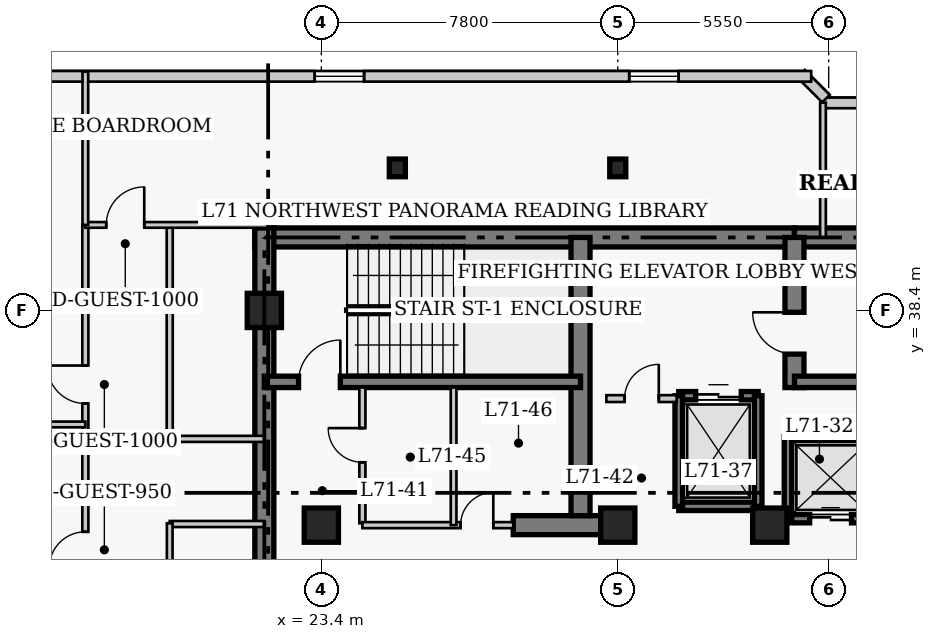
"""IFC4 building model, lengths in metres.
Left out: names, types, materials, properties, quantities, classifications, styles, units other than length and angle.
Written with IfcOpenShell. Run it as: python <this file> out.ifc"""

import sys

from ifc_helpers import new_model, si_unit, direction, frame, frame_2d, origin, origin_2d, place, context, subcontext, project, spatial, rectangle, i_section, extrude, element, fill, save


model = new_model("IFC4")
c1 = context("Model", 3, precision=1e-05, world=origin(), true_north=direction((0.0, 1.0)))
c2 = subcontext(c1, "Body", "Model", "MODEL_VIEW")
j1 = project(units=[si_unit("LENGTHUNIT", "METRE"), si_unit("PLANEANGLEUNIT", "RADIAN")], contexts=[c1])
p1 = place(None, origin())
s1 = spatial("IfcSite", under=j1, at=p1, CompositionType="ELEMENT")
p2 = place(p1, origin())
s2 = spatial("IfcBuilding", under=s1, at=p2, CompositionType="ELEMENT")
p3 = place(p2, frame((0.0, 0.0, 285.4)))
s3 = spatial("IfcBuildingStorey", under=s2, at=p3, CompositionType="ELEMENT", Elevation=285.4)
p4 = place(p3, frame((21.65, 40.32, 0.0), z_axis=(0.0, 0.0, 1.0), x_axis=(1.0, 0.0, 0.0)))
e1 = element("IfcWall", 1, at=p4, inside=s3, PredefinedType="SHEAR", context=c2, shape_type="SweptSolid", body=[
    extrude(rectangle(XDim=14.2, YDim=0.5, at=frame_2d((7.1, 0.0))), origin(), (0.0, 0.0, 1.0), 4.0),
])
p5 = place(p3, frame((35.85, 40.32, 0.0), z_axis=(0.0, 0.0, 1.0), x_axis=(1.0, 0.0, 0.0)))
e2 = element("IfcWall", 2, at=p5, inside=s3, PredefinedType="SHEAR", context=c2, shape_type="SweptSolid", body=[
    extrude(rectangle(XDim=12.6, YDim=0.5, at=frame_2d((6.3, 0.0))), origin(), (0.0, 0.0, 1.0), 4.0),
])
p6 = place(p3, frame((21.9, 27.05, 0.0), z_axis=(0.0, 0.0, 1.0), x_axis=(0.0, 1.0, 0.0)))
e3 = element("IfcWall", 3, at=p6, inside=s3, PredefinedType="SHEAR", context=c2, shape_type="SweptSolid", body=[
    extrude(rectangle(XDim=13.52, YDim=0.5, at=frame_2d((6.76, 0.0))), origin(), (0.0, 0.0, 1.0), 4.0),
])
p7 = place(p3, frame((28.45, 32.75, 0.0), z_axis=(0.0, 0.0, 1.0), x_axis=(1.0, 0.0, 0.0)))
e4 = element("IfcWall", 4, at=p7, inside=s3, PredefinedType="SHEAR", context=c2, shape_type="SweptSolid", body=[
    extrude(rectangle(XDim=2.4, YDim=0.5, at=frame_2d((1.2, 0.0))), origin(), (0.0, 0.0, 1.0), 4.0),
])
p8 = place(p3, frame((30.22, 33.0, 0.0), z_axis=(0.0, 0.0, 1.0), x_axis=(0.0, 1.0, 0.0)))
e5 = element("IfcWall", 5, at=p8, inside=s3, PredefinedType="SHEAR", context=c2, shape_type="SweptSolid", body=[
    extrude(rectangle(XDim=7.32, YDim=0.5, at=frame_2d((3.66, 0.0))), origin(), (0.0, 0.0, 1.0), 4.0),
])
p9 = place(p3, frame((35.85, 36.37, 0.0), z_axis=(0.0, 0.0, 1.0), x_axis=(0.0, 1.0, 0.0)))
e6 = element("IfcWall", 6, at=p9, inside=s3, PredefinedType="SHEAR", context=c2, shape_type="SweptSolid", body=[
    extrude(rectangle(XDim=3.95, YDim=0.5, at=frame_2d((1.975, 0.0))), origin(), (0.0, 0.0, 1.0), 4.0),
])
p10 = place(p9, frame((0.88, 0.0, 0.0)))
e7 = element("IfcOpeningElement", 7, at=p10, cuts=e6, PredefinedType="OPENING", context=c2, shape_type="SweptSolid", body=[
    extrude(rectangle(XDim=1.1, YDim=2.15, at=frame_2d((0.55, 1.075))), frame((0.0, 0.26, 0.0), z_axis=(0.0, -1.0, 0.0), x_axis=(1.0, 0.0, 0.0)), (0.0, 0.0, 1.0), 0.52),
])
p11 = place(p3, frame((21.9, 36.52, 0.0), z_axis=(0.0, 0.0, 1.0), x_axis=(1.0, 0.0, 0.0)))
e8 = element("IfcWall", 8, at=p11, inside=s3, PredefinedType="SHEAR", context=c2, shape_type="SweptSolid", body=[
    extrude(rectangle(XDim=8.32, YDim=0.3, at=frame_2d((4.16, 0.0))), origin(), (0.0, 0.0, 1.0), 4.0),
])
p12 = place(p11, frame((0.9, 0.0, 0.0)))
e9 = element("IfcOpeningElement", 9, at=p12, cuts=e8, PredefinedType="OPENING", context=c2, shape_type="SweptSolid", body=[
    extrude(rectangle(XDim=1.1, YDim=2.15, at=frame_2d((0.55, 1.075))), frame((0.0, 0.16, 0.0), z_axis=(0.0, -1.0, 0.0), x_axis=(1.0, 0.0, 0.0)), (0.0, 0.0, 1.0), 0.32),
])
p13 = place(p3, frame((35.85, 36.52, 0.0), z_axis=(0.0, 0.0, 1.0), x_axis=(1.0, 0.0, 0.0)))
e10 = element("IfcWall", 10, at=p13, inside=s3, PredefinedType="SHEAR", context=c2, shape_type="SweptSolid", body=[
    extrude(rectangle(XDim=8.33, YDim=0.3, at=frame_2d((4.165, 0.0))), origin(), (0.0, 0.0, 1.0), 4.0),
])
for number, where, z_axis, x_axis in (
    (11, (21.9, 38.4, 0.0), (0.0, 0.0, 1.0), (1.0, 0.0, 0.0)),
    (12, (23.4, 32.75, 0.0), (0.0, 0.0, 1.0), (1.0, 0.0, 0.0)),
    (13, (31.2, 32.75, 0.0), (0.0, 0.0, 1.0), (1.0, 0.0, 0.0)),
    (14, (35.2, 32.75, 0.0), (0.0, 0.0, 1.0), (1.0, 0.0, 0.0)),
):
    element("IfcColumn", number, at=place(p3, frame(where, z_axis=z_axis, x_axis=x_axis)), inside=s3, PredefinedType="COLUMN", context=c2, shape_type="SweptSolid", body=[
        extrude(rectangle(XDim=0.9, YDim=0.9, at=origin_2d()), origin(), (0.0, 0.0, 1.0), 4.0),
    ])
for number, where, z_axis, x_axis in (
    (15, (25.4, 42.15, 0.0), (0.0, 0.0, 1.0), (1.0, 0.0, 0.0)),
    (16, (31.2, 42.15, 0.0), (0.0, 0.0, 1.0), (1.0, 0.0, 0.0)),
):
    element("IfcColumn", number, at=place(p3, frame(where, z_axis=z_axis, x_axis=x_axis)), inside=s3, PredefinedType="COLUMN", context=c2, shape_type="SweptSolid", body=[
        extrude(i_section(OverallWidth=0.422, OverallDepth=0.465, WebThickness=0.045, FlangeThickness=0.073, FilletRadius=0.017, at=origin_2d()), origin(), (0.0, 0.0, 1.0), 4.0),
    ])
p14 = place(p3, frame((41.39, 43.86, 0.0), z_axis=(0.0, 0.0, 1.0), x_axis=(-1.0, 0.0, 0.0)))
e17 = element("IfcWall", 17, at=p14, inside=s3, PredefinedType="SOLIDWALL", context=c2, shape_type="SweptSolid", body=[
    extrude(rectangle(XDim=4.78, YDim=0.28, at=frame_2d((2.39, 0.0))), origin(), (0.0, 0.0, 1.0), 3.76),
])
p15 = place(p14, frame((1.74, 0.0, 0.85)))
e18 = element("IfcOpeningElement", 18, at=p15, cuts=e17, PredefinedType="OPENING", context=c2, shape_type="SweptSolid", body=[
    extrude(rectangle(XDim=1.3, YDim=1.7, at=frame_2d((0.65, 0.85))), frame((0.0, 0.15, 0.0), z_axis=(0.0, -1.0, 0.0), x_axis=(1.0, 0.0, 0.0)), (0.0, 0.0, 1.0), 0.3),
])
p16 = place(p3, frame((36.679, 43.973, 0.0), z_axis=(0.0, 0.0, 1.0), x_axis=(-0.706975312048, 0.707238225886, 0.0)))
e19 = element("IfcWall", 19, at=p16, inside=s3, PredefinedType="SOLIDWALL", context=c2, shape_type="SweptSolid", body=[
    extrude(rectangle(XDim=0.929, YDim=0.28, at=frame_2d((0.464, 0.0))), origin(), (0.0, 0.0, 1.0), 3.76),
])
p17 = place(p3, frame((36.29, 44.56, 0.0), z_axis=(0.0, 0.0, 1.0), x_axis=(-1.0, 0.0, 0.0)))
e20 = element("IfcWall", 20, at=p17, inside=s3, PredefinedType="SOLIDWALL", context=c2, shape_type="SweptSolid", body=[
    extrude(rectangle(XDim=24.83, YDim=0.28, at=frame_2d((12.415, 0.0))), origin(), (0.0, 0.0, 1.0), 3.76),
])
p18 = place(p17, frame((3.488, 0.0, 0.85)))
e21 = element("IfcOpeningElement", 21, at=p18, cuts=e20, PredefinedType="OPENING", context=c2, shape_type="SweptSolid", body=[
    extrude(rectangle(XDim=1.3, YDim=1.7, at=frame_2d((0.65, 0.85))), frame((0.0, 0.15, 0.0), z_axis=(0.0, -1.0, 0.0), x_axis=(1.0, 0.0, 0.0)), (0.0, 0.0, 1.0), 0.3),
])
p19 = place(p17, frame((11.765, 0.0, 0.85)))
e22 = element("IfcOpeningElement", 22, at=p19, cuts=e20, PredefinedType="OPENING", context=c2, shape_type="SweptSolid", body=[
    extrude(rectangle(XDim=1.3, YDim=1.7, at=frame_2d((0.65, 0.85))), frame((0.0, 0.15, 0.0), z_axis=(0.0, -1.0, 0.0), x_axis=(1.0, 0.0, 0.0)), (0.0, 0.0, 1.0), 0.3),
])
p20 = place(p17, frame((20.042, 0.0, 0.85)))
e23 = element("IfcOpeningElement", 23, at=p20, cuts=e20, PredefinedType="OPENING", context=c2, shape_type="SweptSolid", body=[
    extrude(rectangle(XDim=1.3, YDim=1.7, at=frame_2d((0.65, 0.85))), frame((0.0, 0.15, 0.0), z_axis=(0.0, -1.0, 0.0), x_axis=(1.0, 0.0, 0.0)), (0.0, 0.0, 1.0), 0.3),
])
p21 = place(p3, frame((35.68, 35.08, 0.0), z_axis=(0.0, 0.0, 1.0), x_axis=(1.0, 0.0, 0.0)))
e24 = element("IfcWall", 24, at=p21, inside=s3, PredefinedType="SHEAR", context=c2, shape_type="SweptSolid", body=[
    extrude(rectangle(XDim=2.32, YDim=0.22, at=frame_2d((1.16, 0.0))), origin(), (0.0, 0.0, 1.0), 4.0),
])
p22 = place(p3, frame((35.68, 32.92, 0.0), z_axis=(0.0, 0.0, 1.0), x_axis=(1.0, 0.0, 0.0)))
e25 = element("IfcWall", 25, at=p22, inside=s3, PredefinedType="SHEAR", context=c2, shape_type="SweptSolid", body=[
    extrude(rectangle(XDim=2.32, YDim=0.22, at=frame_2d((1.16, 0.0))), origin(), (0.0, 0.0, 1.0), 4.0),
])
p23 = place(p22, frame((0.57, 0.0, 0.0)))
e26 = element("IfcOpeningElement", 26, at=p23, cuts=e25, PredefinedType="OPENING", context=c2, shape_type="SweptSolid", body=[
    extrude(rectangle(XDim=1.1, YDim=2.15, at=frame_2d((0.55, 1.075))), frame((0.0, 0.12, 0.0), z_axis=(0.0, -1.0, 0.0), x_axis=(1.0, 0.0, 0.0)), (0.0, 0.0, 1.0), 0.24),
])
p24 = place(p3, frame((35.68, 32.92, 0.0), z_axis=(0.0, 0.0, 1.0), x_axis=(0.0, 1.0, 0.0)))
e27 = element("IfcWall", 27, at=p24, inside=s3, PredefinedType="SHEAR", context=c2, shape_type="SweptSolid", body=[
    extrude(rectangle(XDim=2.16, YDim=0.2, at=frame_2d((1.08, 0.0))), origin(), (0.0, 0.0, 1.0), 4.0),
])
p25 = place(p3, frame((32.805, 36.155, 0.0), z_axis=(0.0, 0.0, 1.0), x_axis=(1.0, 0.0, 0.0)))
e28 = element("IfcWall", 28, at=p25, inside=s3, PredefinedType="SHEAR", context=c2, shape_type="SweptSolid", body=[
    extrude(rectangle(XDim=2.09, YDim=0.22, at=frame_2d((1.045, 0.0))), origin(), (0.0, 0.0, 1.0), 4.0),
])
p26 = place(p25, frame((0.445, 0.0, 0.0)))
e29 = element("IfcOpeningElement", 29, at=p26, cuts=e28, PredefinedType="OPENING", context=c2, shape_type="SweptSolid", body=[
    extrude(rectangle(XDim=1.2, YDim=2.15, at=frame_2d((0.6, 1.075))), frame((0.0, 0.12, 0.0), z_axis=(0.0, -1.0, 0.0), x_axis=(1.0, 0.0, 0.0)), (0.0, 0.0, 1.0), 0.24),
])
p27 = place(p3, frame((32.805, 33.245, 0.0), z_axis=(0.0, 0.0, 1.0), x_axis=(1.0, 0.0, 0.0)))
e30 = element("IfcWall", 30, at=p27, inside=s3, PredefinedType="SHEAR", context=c2, shape_type="SweptSolid", body=[
    extrude(rectangle(XDim=2.09, YDim=0.22, at=frame_2d((1.045, 0.0))), origin(), (0.0, 0.0, 1.0), 4.0),
])
for number, where, z_axis, x_axis in (
    (31, (32.805, 33.245, 0.0), (0.0, 0.0, 1.0), (0.0, 1.0, 0.0)),
    (32, (34.895, 33.245, 0.0), (0.0, 0.0, 1.0), (0.0, 1.0, 0.0)),
):
    element("IfcWall", number, at=place(p3, frame(where, z_axis=z_axis, x_axis=x_axis)), inside=s3, PredefinedType="SHEAR", context=c2, shape_type="SweptSolid", body=[
        extrude(rectangle(XDim=2.91, YDim=0.2, at=frame_2d((1.455, 0.0))), origin(), (0.0, 0.0, 1.0), 4.0),
    ])
p28 = place(p3, frame((30.9, 36.08, 0.0), z_axis=(0.0, 0.0, 1.0), x_axis=(1.0, 0.0, 0.0)))
e33 = element("IfcWall", 33, at=p28, inside=s3, PredefinedType="PARTITIONING", context=c2, shape_type="SweptSolid", body=[
    extrude(rectangle(XDim=1.85, YDim=0.18, at=frame_2d((0.925, 0.0))), origin(), (0.0, 0.0, 1.0), 3.76),
])
p29 = place(p28, frame((0.48, 0.0, 0.0)))
e34 = element("IfcOpeningElement", 34, at=p29, cuts=e33, PredefinedType="OPENING", context=c2, shape_type="SweptSolid", body=[
    extrude(rectangle(XDim=0.9, YDim=2.15, at=frame_2d((0.45, 1.075))), frame((0.0, 0.1, 0.0), z_axis=(0.0, -1.0, 0.0), x_axis=(1.0, 0.0, 0.0)), (0.0, 0.0, 1.0), 0.2),
])
p30 = place(p3, frame((24.48, 32.8, 0.0), z_axis=(0.0, 0.0, 1.0), x_axis=(0.0, 1.0, 0.0)))
e35 = element("IfcWall", 35, at=p30, inside=s3, PredefinedType="PARTITIONING", context=c2, shape_type="SweptSolid", body=[
    extrude(rectangle(XDim=3.57, YDim=0.16, at=frame_2d((1.785, 0.0))), origin(), (0.0, 0.0, 1.0), 3.76),
])
p31 = place(p30, frame((1.604, 0.0, 0.0)))
e36 = element("IfcOpeningElement", 36, at=p31, cuts=e35, PredefinedType="OPENING", context=c2, shape_type="SweptSolid", body=[
    extrude(rectangle(XDim=0.9, YDim=2.1, at=frame_2d((0.45, 1.05))), frame((0.0, 0.09, 0.0), z_axis=(0.0, -1.0, 0.0), x_axis=(1.0, 0.0, 0.0)), (0.0, 0.0, 1.0), 0.18),
])
p32 = place(p3, frame((24.48, 32.75, 0.0), z_axis=(0.0, 0.0, 1.0), x_axis=(1.0, 0.0, 0.0)))
e37 = element("IfcWall", 37, at=p32, inside=s3, PredefinedType="PARTITIONING", context=c2, shape_type="SweptSolid", body=[
    extrude(rectangle(XDim=3.97, YDim=0.16, at=frame_2d((1.985, 0.0))), origin(), (0.0, 0.0, 1.0), 3.76),
])
p33 = place(p32, frame((2.585, 0.0, 0.0)))
e38 = element("IfcOpeningElement", 38, at=p33, cuts=e37, PredefinedType="OPENING", context=c2, shape_type="SweptSolid", body=[
    extrude(rectangle(XDim=0.86, YDim=2.05, at=frame_2d((0.43, 1.025))), frame((0.0, 0.09, 0.0), z_axis=(0.0, -1.0, 0.0), x_axis=(1.0, 0.0, 0.0)), (0.0, 0.0, 1.0), 0.18),
])
p34 = place(p3, frame((26.88, 32.75, 0.0), z_axis=(0.0, 0.0, 1.0), x_axis=(0.0, 1.0, 0.0)))
e39 = element("IfcWall", 39, at=p34, inside=s3, PredefinedType="PARTITIONING", context=c2, shape_type="SweptSolid", body=[
    extrude(rectangle(XDim=3.62, YDim=0.15, at=frame_2d((1.81, 0.0))), origin(), (0.0, 0.0, 1.0), 3.76),
])
p35 = place(p3, frame((17.19, 8.55, 0.0), z_axis=(0.0, 0.0, 1.0), x_axis=(0.0, 1.0, 0.0)))
e40 = element("IfcWall", 40, at=p35, inside=s3, PredefinedType="PARTITIONING", context=c2, shape_type="SweptSolid", body=[
    extrude(rectangle(XDim=32.1, YDim=0.16, at=frame_2d((16.05, 0.0))), origin(), (0.0, 0.0, 1.0), 3.76),
])
p36 = place(p35, frame((5.25, 0.0, 0.0)))
e41 = element("IfcOpeningElement", 41, at=p36, cuts=e40, PredefinedType="OPENING", context=c2, shape_type="SweptSolid", body=[
    extrude(rectangle(XDim=0.95, YDim=2.1, at=frame_2d((0.475, 1.05))), frame((0.0, 0.09, 0.0), z_axis=(0.0, -1.0, 0.0), x_axis=(1.0, 0.0, 0.0)), (0.0, 0.0, 1.0), 0.18),
])
p37 = place(p35, frame((15.375, 0.0, 0.0)))
e42 = element("IfcOpeningElement", 42, at=p37, cuts=e40, PredefinedType="OPENING", context=c2, shape_type="SweptSolid", body=[
    extrude(rectangle(XDim=0.95, YDim=2.1, at=frame_2d((0.475, 1.05))), frame((0.0, 0.09, 0.0), z_axis=(0.0, -1.0, 0.0), x_axis=(1.0, 0.0, 0.0)), (0.0, 0.0, 1.0), 0.18),
])
p38 = place(p35, frame((23.075, 0.0, 0.0)))
e43 = element("IfcOpeningElement", 43, at=p38, cuts=e40, PredefinedType="OPENING", context=c2, shape_type="SweptSolid", body=[
    extrude(rectangle(XDim=0.95, YDim=2.1, at=frame_2d((0.475, 1.05))), frame((0.0, 0.09, 0.0), z_axis=(0.0, -1.0, 0.0), x_axis=(1.0, 0.0, 0.0)), (0.0, 0.0, 1.0), 0.18),
])
p39 = place(p35, frame((27.4, 0.0, 0.0)))
e44 = element("IfcOpeningElement", 44, at=p39, cuts=e40, PredefinedType="OPENING", context=c2, shape_type="SweptSolid", body=[
    extrude(rectangle(XDim=1.0, YDim=2.15, at=frame_2d((0.5, 1.075))), frame((0.0, 0.09, 0.0), z_axis=(0.0, -1.0, 0.0), x_axis=(1.0, 0.0, 0.0)), (0.0, 0.0, 1.0), 0.18),
])
p40 = place(p3, frame((19.41, 35.02, 0.0), z_axis=(0.0, 0.0, 1.0), x_axis=(0.0, 1.0, 0.0)))
e45 = element("IfcWall", 45, at=p40, inside=s3, PredefinedType="PARTITIONING", context=c2, shape_type="SweptSolid", body=[
    extrude(rectangle(XDim=5.63, YDim=0.16, at=frame_2d((2.815, 0.0))), origin(), (0.0, 0.0, 1.0), 3.76),
])
for number, where, z_axis, x_axis in (
    (46, (19.41, 35.02, 0.0), (0.0, 0.0, 1.0), (1.0, 0.0, 0.0)),
    (47, (19.41, 32.78, 0.0), (0.0, 0.0, 1.0), (1.0, 0.0, 0.0)),
):
    element("IfcWall", number, at=place(p3, frame(where, z_axis=z_axis, x_axis=x_axis)), inside=s3, PredefinedType="PARTITIONING", context=c2, shape_type="SweptSolid", body=[
        extrude(rectangle(XDim=2.49, YDim=0.16, at=frame_2d((1.245, 0.0))), origin(), (0.0, 0.0, 1.0), 3.76),
    ])
p41 = place(p3, frame((17.19, 40.65, 0.0), z_axis=(0.0, 0.0, 1.0), x_axis=(1.0, 0.0, 0.0)))
e48 = element("IfcWall", 48, at=p41, inside=s3, PredefinedType="PARTITIONING", context=c2, shape_type="SweptSolid", body=[
    extrude(rectangle(XDim=4.91, YDim=0.15, at=frame_2d((2.455, 0.0))), origin(), (0.0, 0.0, 1.0), 3.76),
])
p42 = place(p41, frame((0.55, 0.0, 0.0)))
e49 = element("IfcOpeningElement", 49, at=p42, cuts=e48, PredefinedType="OPENING", context=c2, shape_type="SweptSolid", body=[
    extrude(rectangle(XDim=1.0, YDim=2.15, at=frame_2d((0.5, 1.075))), frame((0.0, 0.085, 0.0), z_axis=(0.0, -1.0, 0.0), x_axis=(1.0, 0.0, 0.0)), (0.0, 0.0, 1.0), 0.17),
])
p43 = place(p3, frame((19.41, 26.01, 0.0), z_axis=(0.0, 0.0, 1.0), x_axis=(0.0, 1.0, 0.0)))
e50 = element("IfcWall", 50, at=p43, inside=s3, PredefinedType="PARTITIONING", context=c2, shape_type="SweptSolid", body=[
    extrude(rectangle(XDim=6.79, YDim=0.15, at=frame_2d((3.395, 0.0))), origin(), (0.0, 0.0, 1.0), 3.76),
])
p44 = place(p3, frame((17.19, 40.65, 0.0), z_axis=(0.0, 0.0, 1.0), x_axis=(0.0, 1.0, 0.0)))
e51 = element("IfcWall", 51, at=p44, inside=s3, PredefinedType="PARTITIONING", context=c2, shape_type="SweptSolid", body=[
    extrude(rectangle(XDim=4.03, YDim=0.15, at=frame_2d((2.015, 0.0))), origin(), (0.0, 0.0, 1.0), 3.76),
])
p45 = place(p3, frame((36.6, 40.32, 0.0), z_axis=(0.0, 0.0, 1.0), x_axis=(0.0, 1.0, 0.0)))
e52 = element("IfcWall", 52, at=p45, inside=s3, PredefinedType="PARTITIONING", context=c2, shape_type="SweptSolid", body=[
    extrude(rectangle(XDim=3.545, YDim=0.15, at=frame_2d((1.772, 0.0))), origin(), (0.0, 0.0, 1.0), 3.76),
])
p46 = place(p3, frame((14.45, 35.4, 0.0), z_axis=(0.0, 0.0, 1.0), x_axis=(1.0, 0.0, 0.0)))
e53 = element("IfcWall", 53, at=p46, inside=s3, PredefinedType="PARTITIONING", context=c2, shape_type="SweptSolid", body=[
    extrude(rectangle(XDim=2.74, YDim=0.15, at=frame_2d((1.37, 0.0))), origin(), (0.0, 0.0, 1.0), 3.76),
])
p47 = place(p18, origin())
e54 = element("IfcWindow", 54, at=p47, inside=s3, PartitioningType="SINGLE_PANEL", PredefinedType="WINDOW", context=c2, shape_type="SweptSolid", body=[
    extrude(rectangle(XDim=1.3, YDim=1.7, at=frame_2d((0.65, 0.85))), frame((0.0, 0.03, 0.0), z_axis=(0.0, -1.0, 0.0), x_axis=(1.0, 0.0, 0.0)), (0.0, 0.0, 1.0), 0.06),
])
fill(e21, e54)
p48 = place(p19, origin())
e55 = element("IfcWindow", 55, at=p48, inside=s3, PartitioningType="SINGLE_PANEL", PredefinedType="WINDOW", context=c2, shape_type="SweptSolid", body=[
    extrude(rectangle(XDim=1.3, YDim=1.7, at=frame_2d((0.65, 0.85))), frame((0.0, 0.03, 0.0), z_axis=(0.0, -1.0, 0.0), x_axis=(1.0, 0.0, 0.0)), (0.0, 0.0, 1.0), 0.06),
])
fill(e22, e55)
p49 = place(p23, origin())
e56 = element("IfcDoor", 56, at=p49, inside=s3, OperationType="DOUBLE_DOOR_SLIDING", PredefinedType="DOOR", context=c2, shape_type="SweptSolid", body=[
    extrude(rectangle(XDim=1.1, YDim=2.15, at=frame_2d((0.55, 1.075))), frame((0.0, 0.025, 0.0), z_axis=(0.0, -1.0, 0.0), x_axis=(1.0, 0.0, 0.0)), (0.0, 0.0, 1.0), 0.05),
])
fill(e26, e56)
p50 = place(p26, origin())
e57 = element("IfcDoor", 57, at=p50, inside=s3, OperationType="DOUBLE_DOOR_SLIDING", PredefinedType="DOOR", context=c2, shape_type="SweptSolid", body=[
    extrude(rectangle(XDim=1.2, YDim=2.15, at=frame_2d((0.6, 1.075))), frame((0.0, 0.025, 0.0), z_axis=(0.0, -1.0, 0.0), x_axis=(1.0, 0.0, 0.0)), (0.0, 0.0, 1.0), 0.05),
])
fill(e29, e57)
p51 = place(p29, origin())
e58 = element("IfcDoor", 58, at=p51, inside=s3, OperationType="SINGLE_SWING_RIGHT", PredefinedType="DOOR", context=c2, shape_type="SweptSolid", body=[
    extrude(rectangle(XDim=0.9, YDim=2.15, at=frame_2d((0.45, 1.075))), frame((0.0, 0.025, 0.0), z_axis=(0.0, -1.0, 0.0), x_axis=(1.0, 0.0, 0.0)), (0.0, 0.0, 1.0), 0.05),
])
fill(e34, e58)
p52 = place(p31, origin())
e59 = element("IfcDoor", 59, at=p52, inside=s3, OperationType="SINGLE_SWING_RIGHT", PredefinedType="DOOR", context=c2, shape_type="SweptSolid", body=[
    extrude(rectangle(XDim=0.9, YDim=2.1, at=frame_2d((0.45, 1.05))), frame((0.0, 0.025, 0.0), z_axis=(0.0, -1.0, 0.0), x_axis=(1.0, 0.0, 0.0)), (0.0, 0.0, 1.0), 0.05),
])
fill(e36, e59)
p53 = place(p33, origin())
e60 = element("IfcDoor", 60, at=p53, inside=s3, OperationType="SINGLE_SWING_RIGHT", PredefinedType="DOOR", context=c2, shape_type="SweptSolid", body=[
    extrude(rectangle(XDim=0.86, YDim=2.05, at=frame_2d((0.43, 1.025))), frame((0.0, 0.025, 0.0), z_axis=(0.0, -1.0, 0.0), x_axis=(1.0, 0.0, 0.0)), (0.0, 0.0, 1.0), 0.05),
])
fill(e38, e60)
p54 = place(p42, origin())
e61 = element("IfcDoor", 61, at=p54, inside=s3, OperationType="SINGLE_SWING_RIGHT", PredefinedType="DOOR", context=c2, shape_type="SweptSolid", body=[
    extrude(rectangle(XDim=1.0, YDim=2.15, at=frame_2d((0.5, 1.075))), frame((0.0, 0.025, 0.0), z_axis=(0.0, -1.0, 0.0), x_axis=(1.0, 0.0, 0.0)), (0.0, 0.0, 1.0), 0.05),
])
fill(e49, e61)
p55 = place(p38, origin())
e62 = element("IfcDoor", 62, at=p55, inside=s3, OperationType="SINGLE_SWING_LEFT", PredefinedType="DOOR", context=c2, shape_type="SweptSolid", body=[
    extrude(rectangle(XDim=0.95, YDim=2.1, at=frame_2d((0.475, 1.05))), frame((0.0, 0.025, 0.0), z_axis=(0.0, -1.0, 0.0), x_axis=(1.0, 0.0, 0.0)), (0.0, 0.0, 1.0), 0.05),
])
fill(e43, e62)
p56 = place(p39, origin())
e63 = element("IfcDoor", 63, at=p56, inside=s3, OperationType="SINGLE_SWING_RIGHT", PredefinedType="DOOR", context=c2, shape_type="SweptSolid", body=[
    extrude(rectangle(XDim=1.0, YDim=2.15, at=frame_2d((0.5, 1.075))), frame((0.0, 0.025, 0.0), z_axis=(0.0, -1.0, 0.0), x_axis=(1.0, 0.0, 0.0)), (0.0, 0.0, 1.0), 0.05),
])
fill(e44, e63)
p57 = place(p12, origin())
e64 = element("IfcDoor", 64, at=p57, inside=s3, OperationType="SINGLE_SWING_RIGHT", PredefinedType="DOOR", context=c2, shape_type="SweptSolid", body=[
    extrude(rectangle(XDim=1.1, YDim=2.15, at=frame_2d((0.55, 1.075))), frame((0.0, 0.025, 0.0), z_axis=(0.0, -1.0, 0.0), x_axis=(1.0, 0.0, 0.0)), (0.0, 0.0, 1.0), 0.05),
])
fill(e9, e64)
p58 = place(p10, origin())
e65 = element("IfcDoor", 65, at=p58, inside=s3, OperationType="SINGLE_SWING_RIGHT", PredefinedType="DOOR", context=c2, shape_type="SweptSolid", body=[
    extrude(rectangle(XDim=1.1, YDim=2.15, at=frame_2d((0.55, 1.075))), frame((0.0, 0.025, 0.0), z_axis=(0.0, -1.0, 0.0), x_axis=(1.0, 0.0, 0.0)), (0.0, 0.0, 1.0), 0.05),
])
fill(e7, e65)
save(model, sys.argv[1])
